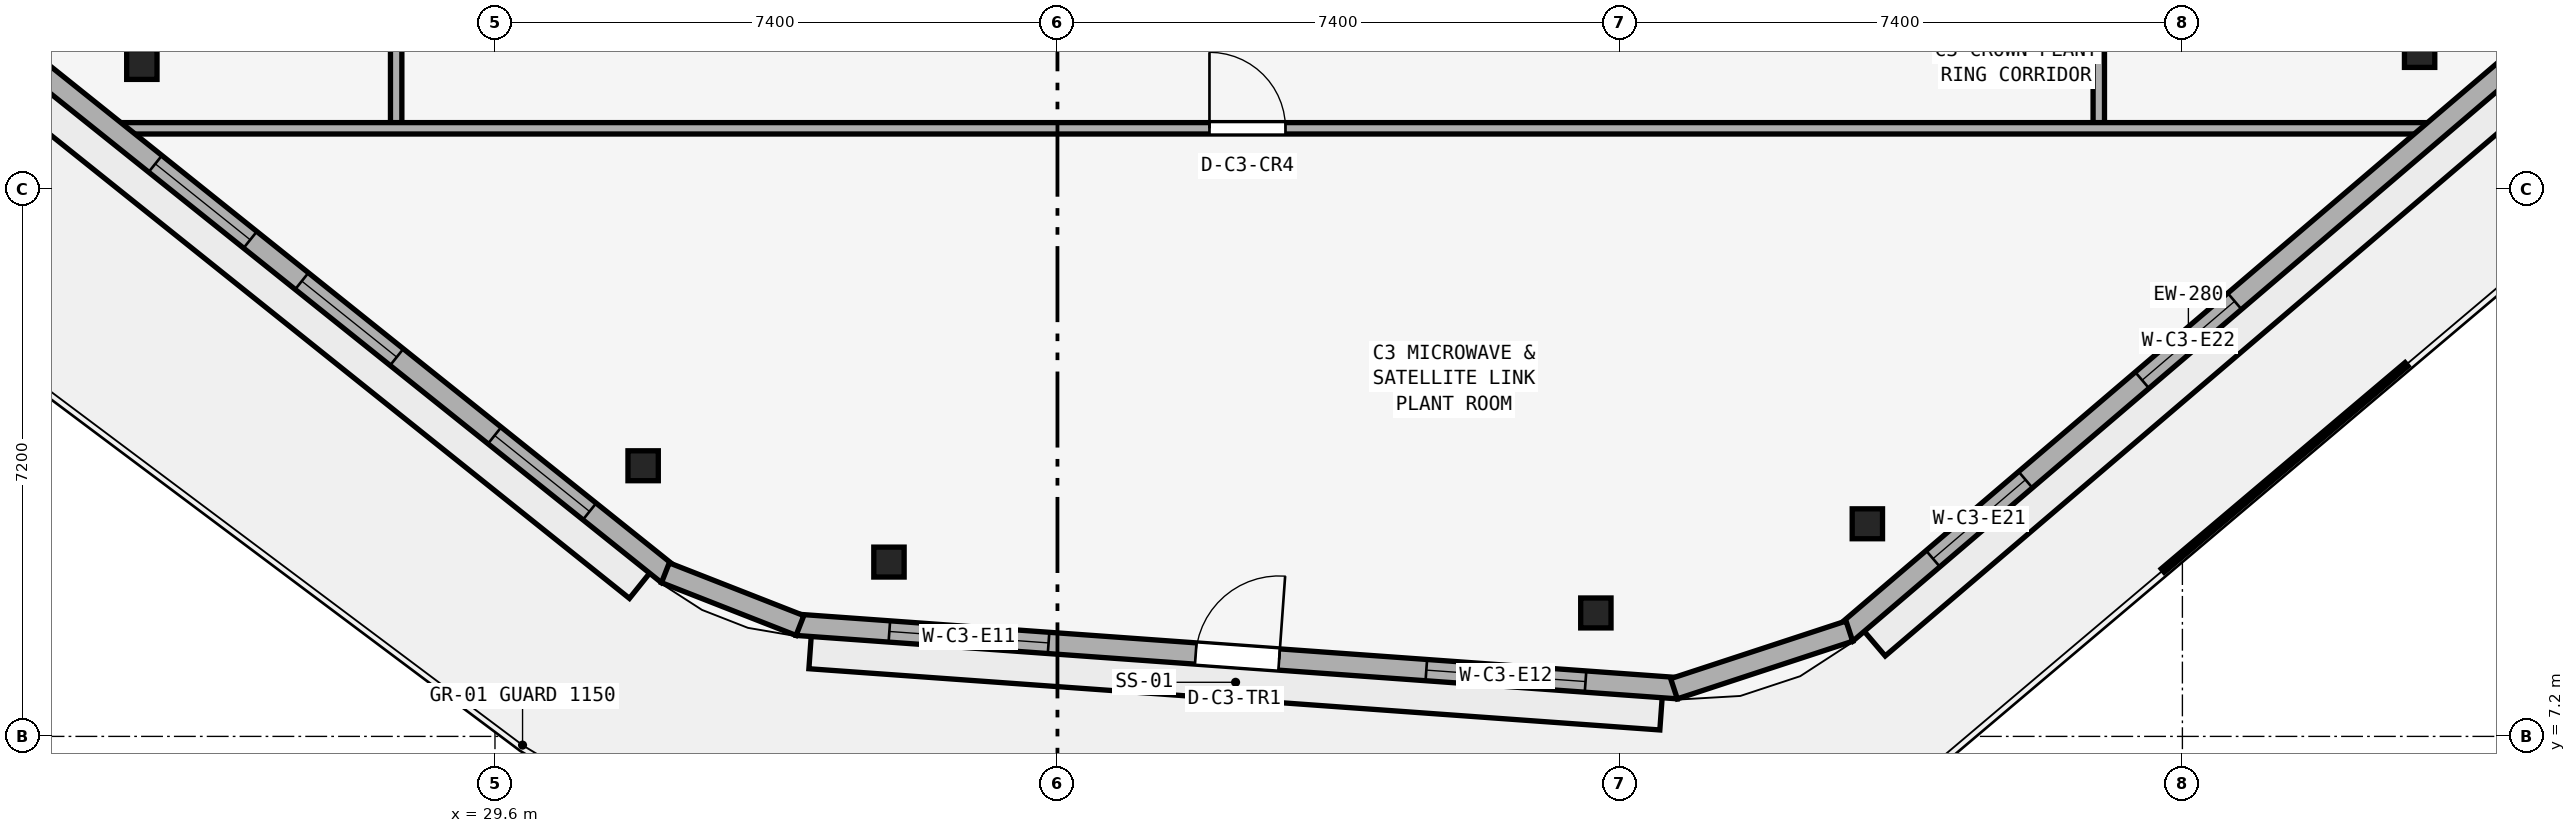
"""IFC4 building model, lengths in metres.
Left out: names, types, materials, properties, quantities, classifications, styles, units other than length and angle.
Written with IfcOpenShell. Run it as: python <this file> out.ifc"""

import sys

from ifc_helpers import new_model, si_unit, direction, frame, frame_2d, origin, origin_2d, place, context, subcontext, project, spatial, rectangle, i_section, extrude, element, fill, save


model = new_model("IFC4")
c1 = context("Model", 3, precision=1e-05, world=origin(), true_north=direction((0.0, 1.0)))
c2 = subcontext(c1, "Body", "Model", "MODEL_VIEW")
j1 = project(units=[si_unit("LENGTHUNIT", "METRE"), si_unit("PLANEANGLEUNIT", "RADIAN")], contexts=[c1])
p1 = place(None, origin())
s1 = spatial("IfcSite", under=j1, at=p1, CompositionType="ELEMENT")
p2 = place(p1, origin())
s2 = spatial("IfcBuilding", under=s1, at=p2, CompositionType="ELEMENT")
p3 = place(p2, frame((0.0, 0.0, 321.4)))
s3 = spatial("IfcBuildingStorey", under=s2, at=p3, CompositionType="ELEMENT", Elevation=321.4)
for number, where, z_axis, x_axis in (
    (1, (34.783, 9.493, 0.0), (0.0, 0.0, 1.0), (1.0, 0.0, 0.0)),
    (2, (44.083, 8.824, 0.0), (0.0, 0.0, 1.0), (1.0, 0.0, 0.0)),
    (3, (47.655, 9.997, 0.0), (0.0, 0.0, 1.0), (1.0, 0.0, 0.0)),
    (4, (54.921, 16.198, 0.0), (0.0, 0.0, 1.0), (1.0, 0.0, 0.0)),
    (5, (24.954, 16.04, 0.0), (0.0, 0.0, 1.0), (1.0, 0.0, 0.0)),
    (6, (31.549, 10.76, 0.0), (0.0, 0.0, 1.0), (1.0, 0.0, 0.0)),
):
    element("IfcColumn", number, at=place(p3, frame(where, z_axis=z_axis, x_axis=x_axis)), inside=s3, PredefinedType="COLUMN", context=c2, shape_type="SweptSolid", body=[
        extrude(i_section(OverallWidth=0.399, OverallDepth=0.394, WebThickness=0.023, FlangeThickness=0.037, at=origin_2d()), origin(), (0.0, 0.0, 1.0), 4.0),
    ])
p4 = place(p3, frame((50.7, 15.2, 0.0), z_axis=(0.0, 0.0, 1.0), x_axis=(0.0, 1.0, 0.0)))
e7 = element("IfcWall", 7, at=p4, inside=s3, PredefinedType="PARTITIONING", context=c2, shape_type="SweptSolid", body=[
    extrude(rectangle(XDim=20.0, YDim=0.15, at=frame_2d((10.0, 0.0))), origin(), (0.0, 0.0, 1.0), 3.72),
])
p5 = place(p4, frame((9.5, 0.0, 0.0)))
e8 = element("IfcOpeningElement", 8, at=p5, cuts=e7, PredefinedType="OPENING", context=c2, shape_type="SweptSolid", body=[
    extrude(rectangle(XDim=1.0, YDim=2.12, at=frame_2d((0.5, 1.06))), frame((0.0, 0.085, 0.0), z_axis=(0.0, -1.0, 0.0), x_axis=(1.0, 0.0, 0.0)), (0.0, 0.0, 1.0), 0.17),
])
p6 = place(p3, frame((28.3, 15.2, 0.0), z_axis=(0.0, 0.0, 1.0), x_axis=(0.0, 1.0, 0.0)))
e9 = element("IfcWall", 9, at=p6, inside=s3, PredefinedType="PARTITIONING", context=c2, shape_type="SweptSolid", body=[
    extrude(rectangle(XDim=20.0, YDim=0.15, at=frame_2d((10.0, 0.0))), origin(), (0.0, 0.0, 1.0), 3.72),
])
p7 = place(p6, frame((9.5, 0.0, 0.0)))
e10 = element("IfcOpeningElement", 10, at=p7, cuts=e9, PredefinedType="OPENING", context=c2, shape_type="SweptSolid", body=[
    extrude(rectangle(XDim=1.0, YDim=2.12, at=frame_2d((0.5, 1.06))), frame((0.0, 0.085, 0.0), z_axis=(0.0, -1.0, 0.0), x_axis=(1.0, 0.0, 0.0)), (0.0, 0.0, 1.0), 0.17),
])
p8 = place(p3, frame((24.464, 15.2, 0.0), z_axis=(0.0, 0.0, 1.0), x_axis=(1.0, 0.0, 0.0)))
e11 = element("IfcWall", 11, at=p8, inside=s3, PredefinedType="PARTITIONING", context=c2, shape_type="SweptSolid", body=[
    extrude(rectangle(XDim=30.765, YDim=0.15, at=frame_2d((15.383, 0.0))), origin(), (0.0, 0.0, 1.0), 3.72),
])
p9 = place(p8, frame((14.536, 0.0, 0.0)))
e12 = element("IfcOpeningElement", 12, at=p9, cuts=e11, PredefinedType="OPENING", context=c2, shape_type="SweptSolid", body=[
    extrude(rectangle(XDim=1.0, YDim=2.12, at=frame_2d((0.5, 1.06))), frame((0.0, 0.085, 0.0), z_axis=(0.0, -1.0, 0.0), x_axis=(1.0, 0.0, 0.0)), (0.0, 0.0, 1.0), 0.17),
])
p10 = place(p3, frame((33.571, 8.668, 0.0), z_axis=(0.0, 0.0, 1.0), x_axis=(0.997419851389, -0.071788857463, 0.0)))
e13 = element("IfcWall", 13, at=p10, inside=s3, PredefinedType="STANDARD", context=c2, shape_type="SweptSolid", body=[
    extrude(rectangle(XDim=11.624, YDim=0.28, at=frame_2d((5.812, 0.0))), origin(), (0.0, 0.0, 1.0), 3.72),
])
p11 = place(p10, frame((5.262, 0.0, 0.0)))
e14 = element("IfcOpeningElement", 14, at=p11, cuts=e13, PredefinedType="OPENING", context=c2, shape_type="SweptSolid", body=[
    extrude(rectangle(XDim=1.1, YDim=2.2, at=frame_2d((0.55, 1.1))), frame((0.0, 0.15, 0.0), z_axis=(0.0, -1.0, 0.0), x_axis=(1.0, 0.0, 0.0)), (0.0, 0.0, 1.0), 0.3),
])
p12 = place(p10, frame((1.221, 0.0, 0.9)))
e15 = element("IfcOpeningElement", 15, at=p12, cuts=e13, PredefinedType="OPENING", context=c2, shape_type="SweptSolid", body=[
    extrude(rectangle(XDim=2.1, YDim=1.7, at=frame_2d((1.05, 0.85))), frame((0.0, 0.15, 0.0), z_axis=(0.0, -1.0, 0.0), x_axis=(1.0, 0.0, 0.0)), (0.0, 0.0, 1.0), 0.3),
])
p13 = place(p10, frame((8.303, 0.0, 0.9)))
e16 = element("IfcOpeningElement", 16, at=p13, cuts=e13, PredefinedType="OPENING", context=c2, shape_type="SweptSolid", body=[
    extrude(rectangle(XDim=2.1, YDim=1.7, at=frame_2d((1.05, 0.85))), frame((0.0, 0.15, 0.0), z_axis=(0.0, -1.0, 0.0), x_axis=(1.0, 0.0, 0.0)), (0.0, 0.0, 1.0), 0.3),
])
p14 = place(p3, frame((47.371, 8.558, 0.0), z_axis=(0.0, 0.0, 1.0), x_axis=(0.760637685394, 0.649176641261, 0.0)))
e17 = element("IfcWall", 17, at=p14, inside=s3, PredefinedType="STANDARD", context=c2, shape_type="SweptSolid", body=[
    extrude(rectangle(XDim=11.852, YDim=0.28, at=frame_2d((5.926, 0.0))), origin(), (0.0, 0.0, 1.0), 3.72),
])
p15 = place(p14, frame((1.509, 0.0, 0.9)))
e18 = element("IfcOpeningElement", 18, at=p15, cuts=e17, PredefinedType="OPENING", context=c2, shape_type="SweptSolid", body=[
    extrude(rectangle(XDim=1.6, YDim=1.45, at=frame_2d((0.8, 0.725))), frame((0.0, 0.15, 0.0), z_axis=(0.0, -1.0, 0.0), x_axis=(1.0, 0.0, 0.0)), (0.0, 0.0, 1.0), 0.3),
])
p16 = place(p14, frame((5.126, 0.0, 0.9)))
e19 = element("IfcOpeningElement", 19, at=p16, cuts=e17, PredefinedType="OPENING", context=c2, shape_type="SweptSolid", body=[
    extrude(rectangle(XDim=1.6, YDim=1.45, at=frame_2d((0.8, 0.725))), frame((0.0, 0.15, 0.0), z_axis=(0.0, -1.0, 0.0), x_axis=(1.0, 0.0, 0.0)), (0.0, 0.0, 1.0), 0.3),
])
p17 = place(p3, frame((23.488, 16.049, 0.0), z_axis=(0.0, 0.0, 1.0), x_axis=(0.780662671576, -0.624952632771, 0.0)))
e20 = element("IfcWall", 20, at=p17, inside=s3, PredefinedType="STANDARD", context=c2, shape_type="SweptSolid", body=[
    extrude(rectangle(XDim=10.748, YDim=0.28, at=frame_2d((5.374, 0.0))), origin(), (0.0, 0.0, 1.0), 3.72),
])
p18 = place(p17, frame((2.105, 0.0, 0.9)))
e21 = element("IfcOpeningElement", 21, at=p18, cuts=e20, PredefinedType="OPENING", context=c2, shape_type="SweptSolid", body=[
    extrude(rectangle(XDim=1.6, YDim=1.45, at=frame_2d((0.8, 0.725))), frame((0.0, 0.15, 0.0), z_axis=(0.0, -1.0, 0.0), x_axis=(1.0, 0.0, 0.0)), (0.0, 0.0, 1.0), 0.3),
])
p19 = place(p17, frame((4.574, 0.0, 0.9)))
e22 = element("IfcOpeningElement", 22, at=p19, cuts=e20, PredefinedType="OPENING", context=c2, shape_type="SweptSolid", body=[
    extrude(rectangle(XDim=1.6, YDim=1.45, at=frame_2d((0.8, 0.725))), frame((0.0, 0.15, 0.0), z_axis=(0.0, -1.0, 0.0), x_axis=(1.0, 0.0, 0.0)), (0.0, 0.0, 1.0), 0.3),
])
p20 = place(p17, frame((7.823, 0.0, 0.9)))
e23 = element("IfcOpeningElement", 23, at=p20, cuts=e20, PredefinedType="OPENING", context=c2, shape_type="SweptSolid", body=[
    extrude(rectangle(XDim=1.6, YDim=1.45, at=frame_2d((0.8, 0.725))), frame((0.0, 0.15, 0.0), z_axis=(0.0, -1.0, 0.0), x_axis=(1.0, 0.0, 0.0)), (0.0, 0.0, 1.0), 0.3),
])
p21 = place(p3, frame((45.111, 7.827, 0.0), z_axis=(0.0, 0.0, 1.0), x_axis=(0.9500615591, 0.31206254809, 0.0)))
e24 = element("IfcWall", 24, at=p21, inside=s3, PredefinedType="STANDARD", context=c2, shape_type="SweptSolid", body=[
    extrude(rectangle(XDim=2.428, YDim=0.28, at=frame_2d((1.214, 0.0))), origin(), (0.0, 0.0, 1.0), 3.72),
])
p22 = place(p3, frame((31.842, 9.353, 0.0), z_axis=(0.0, 0.0, 1.0), x_axis=(0.931039929506, -0.364917318943, 0.0)))
e25 = element("IfcWall", 25, at=p22, inside=s3, PredefinedType="STANDARD", context=c2, shape_type="SweptSolid", body=[
    extrude(rectangle(XDim=1.901, YDim=0.28, at=frame_2d((0.951, 0.0))), origin(), (0.0, 0.0, 1.0), 3.72),
])
p23 = place(p9, origin())
e26 = element("IfcDoor", 26, at=p23, inside=s3, OperationType="SINGLE_SWING_LEFT", PredefinedType="DOOR", context=c2, shape_type="SweptSolid", body=[
    extrude(rectangle(XDim=1.0, YDim=2.12, at=frame_2d((0.5, 1.06))), frame((0.0, 0.025, 0.0), z_axis=(0.0, -1.0, 0.0), x_axis=(1.0, 0.0, 0.0)), (0.0, 0.0, 1.0), 0.05),
])
fill(e12, e26)
p24 = place(p11, origin())
e27 = element("IfcDoor", 27, at=p24, inside=s3, OperationType="SINGLE_SWING_RIGHT", PredefinedType="DOOR", context=c2, shape_type="SweptSolid", body=[
    extrude(rectangle(XDim=1.1, YDim=2.2, at=frame_2d((0.55, 1.1))), frame((0.0, 0.025, 0.0), z_axis=(0.0, -1.0, 0.0), x_axis=(1.0, 0.0, 0.0)), (0.0, 0.0, 1.0), 0.05),
])
fill(e14, e27)
p25 = place(p12, origin())
e28 = element("IfcWindow", 28, at=p25, inside=s3, PartitioningType="SINGLE_PANEL", PredefinedType="WINDOW", context=c2, shape_type="SweptSolid", body=[
    extrude(rectangle(XDim=2.1, YDim=1.7, at=frame_2d((1.05, 0.85))), frame((0.0, 0.03, 0.0), z_axis=(0.0, -1.0, 0.0), x_axis=(1.0, 0.0, 0.0)), (0.0, 0.0, 1.0), 0.06),
])
fill(e15, e28)
p26 = place(p13, origin())
e29 = element("IfcWindow", 29, at=p26, inside=s3, PartitioningType="SINGLE_PANEL", PredefinedType="WINDOW", context=c2, shape_type="SweptSolid", body=[
    extrude(rectangle(XDim=2.1, YDim=1.7, at=frame_2d((1.05, 0.85))), frame((0.0, 0.03, 0.0), z_axis=(0.0, -1.0, 0.0), x_axis=(1.0, 0.0, 0.0)), (0.0, 0.0, 1.0), 0.06),
])
fill(e16, e29)
p27 = place(p15, origin())
e30 = element("IfcWindow", 30, at=p27, inside=s3, PartitioningType="SINGLE_PANEL", PredefinedType="WINDOW", context=c2, shape_type="SweptSolid", body=[
    extrude(rectangle(XDim=1.6, YDim=1.45, at=frame_2d((0.8, 0.725))), frame((0.0, 0.03, 0.0), z_axis=(0.0, -1.0, 0.0), x_axis=(1.0, 0.0, 0.0)), (0.0, 0.0, 1.0), 0.06),
])
fill(e18, e30)
p28 = place(p16, origin())
e31 = element("IfcWindow", 31, at=p28, inside=s3, PartitioningType="SINGLE_PANEL", PredefinedType="WINDOW", context=c2, shape_type="SweptSolid", body=[
    extrude(rectangle(XDim=1.6, YDim=1.45, at=frame_2d((0.8, 0.725))), frame((0.0, 0.03, 0.0), z_axis=(0.0, -1.0, 0.0), x_axis=(1.0, 0.0, 0.0)), (0.0, 0.0, 1.0), 0.06),
])
fill(e19, e31)
p29 = place(p18, origin())
e32 = element("IfcWindow", 32, at=p29, inside=s3, PartitioningType="SINGLE_PANEL", PredefinedType="WINDOW", context=c2, shape_type="SweptSolid", body=[
    extrude(rectangle(XDim=1.6, YDim=1.45, at=frame_2d((0.8, 0.725))), frame((0.0, 0.03, 0.0), z_axis=(0.0, -1.0, 0.0), x_axis=(1.0, 0.0, 0.0)), (0.0, 0.0, 1.0), 0.06),
])
fill(e21, e32)
p30 = place(p19, origin())
e33 = element("IfcWindow", 33, at=p30, inside=s3, PartitioningType="SINGLE_PANEL", PredefinedType="WINDOW", context=c2, shape_type="SweptSolid", body=[
    extrude(rectangle(XDim=1.6, YDim=1.45, at=frame_2d((0.8, 0.725))), frame((0.0, 0.03, 0.0), z_axis=(0.0, -1.0, 0.0), x_axis=(1.0, 0.0, 0.0)), (0.0, 0.0, 1.0), 0.06),
])
fill(e22, e33)
p31 = place(p20, origin())
e34 = element("IfcWindow", 34, at=p31, inside=s3, PartitioningType="SINGLE_PANEL", PredefinedType="WINDOW", context=c2, shape_type="SweptSolid", body=[
    extrude(rectangle(XDim=1.6, YDim=1.45, at=frame_2d((0.8, 0.725))), frame((0.0, 0.03, 0.0), z_axis=(0.0, -1.0, 0.0), x_axis=(1.0, 0.0, 0.0)), (0.0, 0.0, 1.0), 0.06),
])
fill(e23, e34)
save(model, sys.argv[1])
